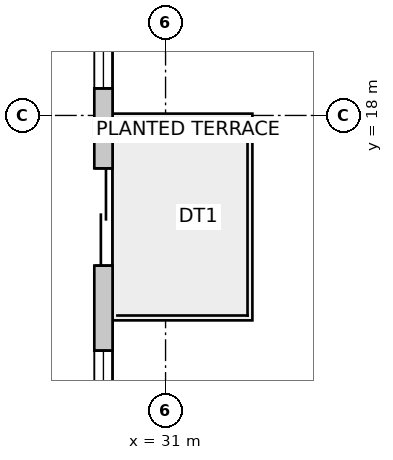
"""IFC4 building model, lengths in metres.
Left out: names, types, materials, properties, quantities, classifications, styles, units other than length and angle.
Written with IfcOpenShell. Run it as: python <this file> out.ifc"""

import sys

from ifc_helpers import new_model, si_unit, direction, frame, frame_2d, origin, place, context, subcontext, project, spatial, rectangle, extrude, source, transform, mapped, element, fill, save


model = new_model("IFC4")
c1 = context("Model", 3, precision=1e-05, world=origin(), true_north=direction((0.0, 1.0)))
c2 = subcontext(c1, "Body", "Model", "MODEL_VIEW")
j1 = project(units=[si_unit("LENGTHUNIT", "METRE"), si_unit("PLANEANGLEUNIT", "RADIAN")], contexts=[c1])
p1 = place(None, origin())
s1 = spatial("IfcSite", under=j1, at=p1, CompositionType="ELEMENT")
p2 = place(p1, origin())
s2 = spatial("IfcBuilding", under=s1, at=p2, CompositionType="ELEMENT")
p3 = place(p2, frame((0.0, 0.0, 59.0)))
s3 = spatial("IfcBuildingStorey", under=s2, at=p3, CompositionType="ELEMENT", Elevation=59.0)
p4 = place(p3, frame((29.978, 5.657, 0.0), z_axis=(0.0, 0.0, 1.0), x_axis=(0.0, 1.0, 0.0)))
e1 = element("IfcWall", 1, at=p4, inside=s3, PredefinedType="SOLIDWALL", context=c2, shape_type="SweptSolid", body=[
    extrude(rectangle(XDim=21.815, YDim=0.3, at=frame_2d((10.907, 0.0))), origin(), (0.0, 0.0, 1.0), 3.7),
])
m1 = source(origin(), c2, "Body", "SweptSolid", [
    extrude(rectangle(XDim=1.6, YDim=2.15, at=frame_2d((0.8, 1.075))), frame((0.0, 0.16, 0.0), z_axis=(0.0, -1.0, 0.0), x_axis=(1.0, 0.0, 0.0)), (0.0, 0.0, 1.0), 0.32),
])
p5 = place(p4, frame((9.873, 0.0, 0.0)))
e2 = element("IfcOpeningElement", 2, at=p5, cuts=e1, PredefinedType="OPENING", context=c2, shape_type="MappedRepresentation", body=[
    mapped(m1, transform((0.0, 0.0, 0.0), scale=1.0)),
])
m2 = source(origin(), c2, "Body", "SweptSolid", [
    extrude(rectangle(XDim=2.8, YDim=2.4, at=frame_2d((1.4, 1.2))), frame((0.0, 0.16, 0.0), z_axis=(0.0, -1.0, 0.0), x_axis=(1.0, 0.0, 0.0)), (0.0, 0.0, 1.0), 0.32),
])
p6 = place(p4, frame((1.238, 0.0, 0.85)))
e3 = element("IfcOpeningElement", 3, at=p6, cuts=e1, PredefinedType="OPENING", context=c2, shape_type="MappedRepresentation", body=[
    mapped(m2, transform((0.0, 0.0, 0.0), scale=1.0)),
])
m3 = source(origin(), c2, "Body", "SweptSolid", [
    extrude(rectangle(XDim=2.4, YDim=2.2, at=frame_2d((1.2, 1.1))), frame((0.0, 0.16, 0.0), z_axis=(0.0, -1.0, 0.0), x_axis=(1.0, 0.0, 0.0)), (0.0, 0.0, 1.0), 0.32),
])
p7 = place(p4, frame((6.075, 0.0, 0.85)))
e4 = element("IfcOpeningElement", 4, at=p7, cuts=e1, PredefinedType="OPENING", context=c2, shape_type="MappedRepresentation", body=[
    mapped(m3, transform((0.0, 0.0, 0.0), scale=1.0)),
])
p8 = place(p4, frame((12.788, 0.0, 0.85)))
e5 = element("IfcOpeningElement", 5, at=p8, cuts=e1, PredefinedType="OPENING", context=c2, shape_type="MappedRepresentation", body=[
    mapped(m2, transform((0.0, 0.0, 0.0), scale=1.0)),
])
p9 = place(p4, frame((17.859, 0.0, 0.85)))
e6 = element("IfcOpeningElement", 6, at=p9, cuts=e1, PredefinedType="OPENING", context=c2, shape_type="MappedRepresentation", body=[
    mapped(m3, transform((0.0, 0.0, 0.0), scale=1.0)),
])
m4 = source(origin(), c2, "Body", "SweptSolid", [
    extrude(rectangle(XDim=1.6, YDim=2.15, at=frame_2d((0.8, 1.075))), frame((0.0, 0.025, 0.0), z_axis=(0.0, -1.0, 0.0), x_axis=(1.0, 0.0, 0.0)), (0.0, 0.0, 1.0), 0.05),
])
p10 = place(p5, origin())
e7 = element("IfcDoor", 7, at=p10, inside=s3, OperationType="DOUBLE_DOOR_SLIDING", PredefinedType="DOOR", context=c2, shape_type="MappedRepresentation", body=[
    mapped(m4, transform((0.0, 0.0, 0.0), scale=1.0)),
])
fill(e2, e7)
m5 = source(origin(), c2, "Body", "SweptSolid", [
    extrude(rectangle(XDim=2.4, YDim=2.2, at=frame_2d((1.2, 1.1))), frame((0.0, -0.015, 0.0), z_axis=(0.0, -1.0, 0.0), x_axis=(1.0, 0.0, 0.0)), (0.0, 0.0, 1.0), 0.06),
])
p11 = place(p7, origin())
e8 = element("IfcWindow", 8, at=p11, inside=s3, PartitioningType="SINGLE_PANEL", PredefinedType="WINDOW", context=c2, shape_type="MappedRepresentation", body=[
    mapped(m5, transform((0.0, 0.0, 0.0), scale=1.0)),
])
fill(e4, e8)
m6 = source(origin(), c2, "Body", "SweptSolid", [
    extrude(rectangle(XDim=2.8, YDim=2.4, at=frame_2d((1.4, 1.2))), frame((0.0, -0.015, 0.0), z_axis=(0.0, -1.0, 0.0), x_axis=(1.0, 0.0, 0.0)), (0.0, 0.0, 1.0), 0.06),
])
p12 = place(p8, origin())
e9 = element("IfcWindow", 9, at=p12, inside=s3, PartitioningType="SINGLE_PANEL", PredefinedType="WINDOW", context=c2, shape_type="MappedRepresentation", body=[
    mapped(m6, transform((0.0, 0.0, 0.0), scale=1.0)),
])
fill(e5, e9)
save(model, sys.argv[1])
